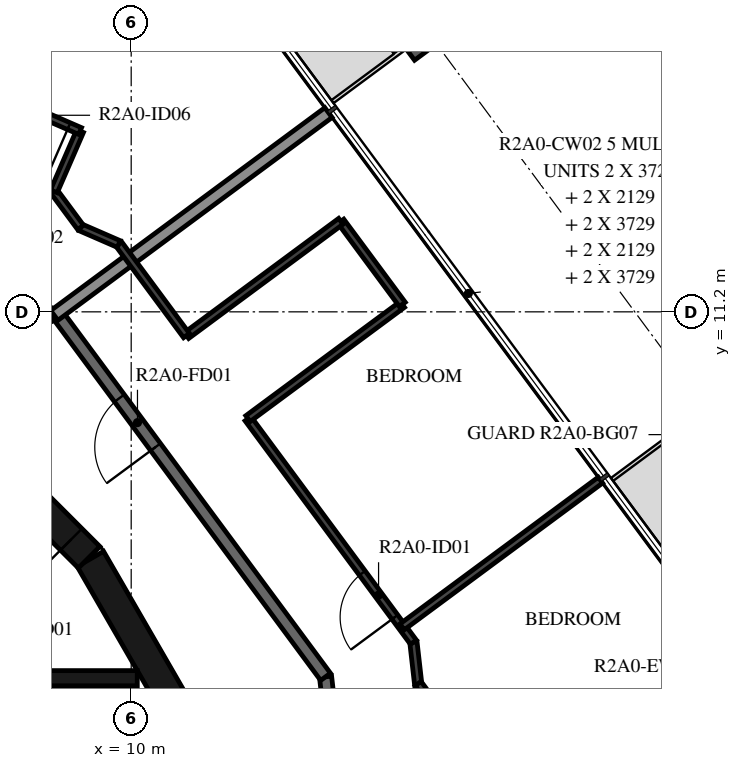
"""IFC4 building model, lengths in metres.
Left out: names, types, materials, properties, quantities, classifications, styles, units other than length and angle.
Written with IfcOpenShell. Run it as: python <this file> out.ifc"""

import sys

from ifc_helpers import new_model, si_unit, direction, frame, frame_2d, origin, origin_2d, place, context, subcontext, project, spatial, polyline, rectangle, i_section, outline, extrude, element, fill, save


model = new_model("IFC4")
c1 = context("Model", 3, precision=1e-05, world=origin(), true_north=direction((0.0, 1.0)))
c2 = subcontext(c1, "Body", "Model", "MODEL_VIEW")
j1 = project(units=[si_unit("LENGTHUNIT", "METRE"), si_unit("PLANEANGLEUNIT", "RADIAN")], contexts=[c1])
p1 = place(None, origin())
s1 = spatial("IfcSite", under=j1, at=p1, CompositionType="ELEMENT")
p2 = place(p1, origin())
s2 = spatial("IfcBuilding", under=s1, at=p2, CompositionType="ELEMENT")
p3 = place(p2, frame((0.0, 0.0, 83.7)))
s3 = spatial("IfcBuildingStorey", under=s2, at=p3, CompositionType="ELEMENT", Elevation=83.7)
p4 = place(p3, frame((14.932, 15.726, -0.38), z_axis=(0.0, 0.0, 1.0), x_axis=(0.594822857897, -0.803856807972, 0.0)))
e1 = element("IfcColumn", 1, at=p4, inside=s3, PredefinedType="COLUMN", context=c2, shape_type="SweptSolid", body=[
    extrude(i_section(OverallWidth=0.3, OverallDepth=0.9, WebThickness=0.019, FlangeThickness=0.035, FilletRadius=0.03, at=origin_2d()), origin(), (0.0, 0.0, 1.0), 3.5),
])
p5 = place(p3, frame((10.845, 4.51, 0.0), z_axis=(0.0, 0.0, 1.0), x_axis=(-0.500087131594, 0.865975092491, 0.0)))
e2 = element("IfcWall", 2, at=p5, inside=s3, PredefinedType="SHEAR", context=c2, shape_type="SweptSolid", body=[
    extrude(rectangle(XDim=3.033, YDim=0.5, at=frame_2d((1.516, 0.0))), origin(), (0.0, 0.0, 1.0), 3.12),
])
p6 = place(p3, frame((9.308, 7.164, 0.0), z_axis=(0.0, 0.0, 1.0), x_axis=(-0.707106781187, 0.707106781187, 0.0)))
e3 = element("IfcWall", 3, at=p6, inside=s3, PredefinedType="SHEAR", context=c2, shape_type="SweptSolid", body=[
    extrude(rectangle(XDim=3.032, YDim=0.5, at=frame_2d((1.516, 0.0))), origin(), (0.0, 0.0, 1.0), 3.12),
])
p7 = place(p6, frame((0.416, 0.0, 0.0)))
e4 = element("IfcOpeningElement", 4, at=p7, cuts=e3, PredefinedType="OPENING", context=c2, shape_type="SweptSolid", body=[
    extrude(rectangle(XDim=1.2, YDim=2.1, at=frame_2d((0.6, 1.05))), frame((0.0, 0.26, 0.0), z_axis=(0.0, -1.0, 0.0), x_axis=(1.0, 0.0, 0.0)), (0.0, 0.0, 1.0), 0.52),
])
p8 = place(p3, frame((7.0, 5.175, 0.0), z_axis=(0.0, 0.0, 1.0), x_axis=(1.0, 0.0, 0.0)))
e5 = element("IfcWall", 5, at=p8, inside=s3, PredefinedType="SHEAR", context=c2, shape_type="SweptSolid", body=[
    extrude(rectangle(XDim=3.1, YDim=0.25, at=frame_2d((1.55, 0.0))), origin(), (0.0, 0.0, 1.0), 3.12),
])
p9 = place(p3, origin())
e6 = element("IfcWall", 6, at=p9, inside=s3, PredefinedType="SHEAR", context=c2, shape_type="SweptSolid", body=[
    extrude(outline(polyline([(-9.55, 4.8), (-7.65, 4.8), (-7.65, 1.9), (-7.4, 1.9), (-7.4, 4.8), (-5.5, 4.8), (-5.5, 1.9), (-5.25, 1.9), (-5.25, 4.8), (-3.35, 4.8), (-3.35, 1.9), (-3.1, 1.9), (-3.1, 4.8), (-1.2, 4.8), (-1.2, 1.9), (-0.95, 1.9), (-0.95, 4.8), (3.1, 4.8), (3.1, 1.9), (3.35, 1.9), (3.35, 4.8), (5.25, 4.8), (5.25, 1.9), (5.5, 1.9), (5.5, 4.8), (7.4, 4.8), (7.4, 1.9), (7.65, 1.9), (7.65, 4.8), (9.55, 4.8), (9.55, 1.9), (9.8, 1.9), (9.8, 4.8), (9.8, 5.05), (-9.8, 5.05), (-9.8, 4.8), (-9.8, 1.9), (-9.55, 1.9), (-9.55, 4.8)])), origin(), (0.0, 0.0, 1.0), 3.12),
])
p10 = place(p3, frame((14.028, -2.096, 0.0), z_axis=(0.0, 0.0, 1.0), x_axis=(-0.113226782163, 0.993569170114, 0.0)))
e7 = element("IfcWall", 7, at=p10, inside=s3, PredefinedType="STANDARD", context=c2, shape_type="SweptSolid", body=[
    extrude(rectangle(XDim=7.342, YDim=0.2, at=frame_2d((3.671, 0.0))), origin(), (0.0, 0.0, 1.0), 3.12),
])
p11 = place(p3, frame((13.196, 5.198, 0.0), z_axis=(0.0, 0.0, 1.0), x_axis=(-0.594805187394, 0.803869883159, 0.0)))
e8 = element("IfcWall", 8, at=p11, inside=s3, PredefinedType="STANDARD", context=c2, shape_type="SweptSolid", body=[
    extrude(rectangle(XDim=7.342, YDim=0.2, at=frame_2d((3.671, 0.0))), origin(), (0.0, 0.0, 1.0), 3.12),
])
p12 = place(p11, frame((4.7, 0.0, 0.0)))
e9 = element("IfcOpeningElement", 9, at=p12, cuts=e8, PredefinedType="OPENING", context=c2, shape_type="SweptSolid", body=[
    extrude(rectangle(XDim=1.0, YDim=2.1, at=frame_2d((0.5, 1.05))), frame((0.0, 0.11, 0.0), z_axis=(0.0, -1.0, 0.0), x_axis=(1.0, 0.0, 0.0)), (0.0, 0.0, 1.0), 0.22),
])
p13 = place(p3, frame((8.736, 11.141, 0.0), z_axis=(0.0, 0.0, 1.0), x_axis=(-0.917051290697, 0.398769269416, 0.0)))
e10 = element("IfcWall", 10, at=p13, inside=s3, PredefinedType="STANDARD", context=c2, shape_type="SweptSolid", body=[
    extrude(rectangle(XDim=7.24, YDim=0.2, at=frame_2d((3.62, 0.0))), origin(), (0.0, 0.0, 1.0), 3.12),
])
p14 = place(p13, frame((0.2, 0.0, 0.0)))
e11 = element("IfcOpeningElement", 11, at=p14, cuts=e10, PredefinedType="OPENING", context=c2, shape_type="SweptSolid", body=[
    extrude(rectangle(XDim=1.0, YDim=2.1, at=frame_2d((0.5, 1.05))), frame((0.0, 0.11, 0.0), z_axis=(0.0, -1.0, 0.0), x_axis=(1.0, 0.0, 0.0)), (0.0, 0.0, 1.0), 0.22),
])
p15 = place(p3, frame((13.244, 14.477, 0.0), z_axis=(0.0, 0.0, 1.0), x_axis=(-0.803853971109, -0.594826691677, 0.0)))
e12 = element("IfcWall", 12, at=p15, inside=s3, PredefinedType="STANDARD", context=c2, shape_type="SweptSolid", body=[
    extrude(rectangle(XDim=5.609, YDim=0.2, at=frame_2d((2.804, 0.0))), origin(), (0.0, 0.0, 1.0), 2.73),
])
p16 = place(p3, frame((15.563, -2.326, 0.0), z_axis=(0.0, 0.0, 1.0), x_axis=(-0.11320423706, 0.993571739087, 0.0)))
e13 = element("IfcWall", 13, at=p16, inside=s3, PredefinedType="PARTITIONING", context=c2, shape_type="SweptSolid", body=[
    extrude(rectangle(XDim=8.146, YDim=0.12, at=frame_2d((4.073, 0.0))), origin(), (0.0, 0.0, 1.0), 3.12),
])
p17 = place(p16, frame((1.592, 0.0, 0.0)))
e14 = element("IfcOpeningElement", 14, at=p17, cuts=e13, PredefinedType="OPENING", context=c2, shape_type="SweptSolid", body=[
    extrude(rectangle(XDim=0.8, YDim=2.1, at=frame_2d((0.4, 1.05))), frame((0.0, 0.07, 0.0), z_axis=(0.0, -1.0, 0.0), x_axis=(1.0, 0.0, 0.0)), (0.0, 0.0, 1.0), 0.14),
])
p18 = place(p3, frame((14.641, 5.767, 0.0), z_axis=(0.0, 0.0, 1.0), x_axis=(-0.594785744505, 0.803884269117, 0.0)))
e15 = element("IfcWall", 15, at=p18, inside=s3, PredefinedType="PARTITIONING", context=c2, shape_type="SweptSolid", body=[
    extrude(rectangle(XDim=4.573, YDim=0.12, at=frame_2d((2.287, 0.0))), origin(), (0.0, 0.0, 1.0), 3.12),
])
p19 = place(p18, frame((0.513, 0.0, 0.0)))
e16 = element("IfcOpeningElement", 16, at=p19, cuts=e15, PredefinedType="OPENING", context=c2, shape_type="SweptSolid", body=[
    extrude(rectangle(XDim=0.9, YDim=2.1, at=frame_2d((0.45, 1.05))), frame((0.0, 0.07, 0.0), z_axis=(0.0, -1.0, 0.0), x_axis=(1.0, 0.0, 0.0)), (0.0, 0.0, 1.0), 0.14),
])
p20 = place(p3, frame((11.921, 9.444, 0.0), z_axis=(0.0, 0.0, 1.0), x_axis=(0.803843378098, 0.594841006898, 0.0)))
e17 = element("IfcWall", 17, at=p20, inside=s3, PredefinedType="PARTITIONING", context=c2, shape_type="SweptSolid", body=[
    extrude(rectangle(XDim=3.157, YDim=0.12, at=frame_2d((1.579, 0.0))), origin(), (0.0, 0.0, 1.0), 3.12),
])
p21 = place(p3, frame((14.459, 11.322, 0.0), z_axis=(0.0, 0.0, 1.0), x_axis=(-0.594863421241, 0.803826791087, 0.0)))
e18 = element("IfcWall", 18, at=p21, inside=s3, PredefinedType="PARTITIONING", context=c2, shape_type="SweptSolid", body=[
    extrude(rectangle(XDim=1.7, YDim=0.12, at=frame_2d((0.85, 0.0))), origin(), (0.0, 0.0, 1.0), 3.12),
])
p22 = place(p3, frame((13.448, 12.688, 0.0), z_axis=(0.0, 0.0, 1.0), x_axis=(-0.803843378098, -0.594841006898, 0.0)))
e19 = element("IfcWall", 19, at=p22, inside=s3, PredefinedType="PARTITIONING", context=c2, shape_type="SweptSolid", body=[
    extrude(rectangle(XDim=3.157, YDim=0.12, at=frame_2d((1.579, 0.0))), origin(), (0.0, 0.0, 1.0), 3.12),
])
p23 = place(p3, frame((10.91, 10.81, 0.0), z_axis=(0.0, 0.0, 1.0), x_axis=(-0.59489693125, 0.803801991282, 0.0)))
e20 = element("IfcWall", 20, at=p23, inside=s3, PredefinedType="PARTITIONING", context=c2, shape_type="SweptSolid", body=[
    extrude(rectangle(XDim=1.872, YDim=0.12, at=frame_2d((0.936, 0.0))), origin(), (0.0, 0.0, 1.0), 3.12),
])
p24 = place(p3, frame((21.201, -3.674, 0.0), z_axis=(0.0, 0.0, 1.0), x_axis=(-0.594822450109, 0.803857109719, 0.0)))
e21 = element("IfcWall", 21, at=p24, inside=s3, PredefinedType="PARTITIONING", context=c2, shape_type="SweptSolid", body=[
    extrude(rectangle(XDim=10.898, YDim=0.12, at=frame_2d((5.449, 0.0))), origin(), (0.0, 0.0, 1.0), 3.12),
])
p25 = place(p24, frame((0.2, 0.0, 0.0)))
e22 = element("IfcOpeningElement", 22, at=p25, cuts=e21, PredefinedType="OPENING", context=c2, shape_type="SweptSolid", body=[
    extrude(rectangle(XDim=0.9, YDim=2.1, at=frame_2d((0.45, 1.05))), frame((0.0, 0.07, 0.0), z_axis=(0.0, -1.0, 0.0), x_axis=(1.0, 0.0, 0.0)), (0.0, 0.0, 1.0), 0.14),
])
p26 = place(p3, frame((17.717, 8.433, 0.0), z_axis=(0.0, 0.0, 1.0), x_axis=(-0.803853407146, -0.594827453821, 0.0)))
e23 = element("IfcWall", 23, at=p26, inside=s3, PredefinedType="PARTITIONING", context=c2, shape_type="SweptSolid", body=[
    extrude(rectangle(XDim=4.058, YDim=0.12, at=frame_2d((2.029, 0.0))), origin(), (0.0, 0.0, 1.0), 2.73),
])
p27 = place(p3, frame((9.796, 12.315, 0.0), z_axis=(0.0, 0.0, 1.0), x_axis=(-0.916973672273, 0.398947721335, 0.0)))
e24 = element("IfcWall", 24, at=p27, inside=s3, PredefinedType="PARTITIONING", context=c2, shape_type="SweptSolid", body=[
    extrude(rectangle(XDim=0.685, YDim=0.12, at=frame_2d((0.342, 0.0))), origin(), (0.0, 0.0, 1.0), 3.12),
])
p28 = place(p3, frame((9.168, 12.588, 0.0), z_axis=(0.0, 0.0, 1.0), x_axis=(-0.595069416139, 0.803674305908, 0.0)))
e25 = element("IfcWall", 25, at=p28, inside=s3, PredefinedType="PARTITIONING", context=c2, shape_type="SweptSolid", body=[
    extrude(rectangle(XDim=0.739, YDim=0.12, at=frame_2d((0.369, 0.0))), origin(), (0.0, 0.0, 1.0), 3.12),
])
p29 = place(p3, frame((8.729, 13.182, 0.0), z_axis=(0.0, 0.0, 1.0), x_axis=(0.398792168027, 0.917041333158, 0.0)))
e26 = element("IfcWall", 26, at=p29, inside=s3, PredefinedType="PARTITIONING", context=c2, shape_type="SweptSolid", body=[
    extrude(rectangle(XDim=1.081, YDim=0.12, at=frame_2d((0.541, 0.0))), origin(), (0.0, 0.0, 1.0), 3.12),
])
p30 = place(p3, frame((9.16, 14.173, 0.0), z_axis=(0.0, 0.0, 1.0), x_axis=(-0.917044941137, 0.398783871208, 0.0)))
e27 = element("IfcWall", 27, at=p30, inside=s3, PredefinedType="PARTITIONING", context=c2, shape_type="SweptSolid", body=[
    extrude(rectangle(XDim=1.7, YDim=0.12, at=frame_2d((0.85, 0.0))), origin(), (0.0, 0.0, 1.0), 3.12),
])
p31 = place(p30, frame((0.2, 0.0, 0.0)))
e28 = element("IfcOpeningElement", 28, at=p31, cuts=e27, PredefinedType="OPENING", context=c2, shape_type="SweptSolid", body=[
    extrude(rectangle(XDim=0.9, YDim=2.1, at=frame_2d((0.45, 1.05))), frame((0.0, 0.07, 0.0), z_axis=(0.0, -1.0, 0.0), x_axis=(1.0, 0.0, 0.0)), (0.0, 0.0, 1.0), 0.14),
])
p32 = place(p3, frame((8.772, 20.521, 0.0), z_axis=(0.0, 0.0, 1.0), x_axis=(-0.202291839423, -0.979325283909, 0.0)))
e29 = element("IfcWall", 29, at=p32, inside=s3, PredefinedType="PARTITIONING", context=c2, shape_type="SweptSolid", body=[
    extrude(rectangle(XDim=5.789, YDim=0.12, at=frame_2d((2.895, 0.0))), origin(), (0.0, 0.0, 1.0), 3.12),
])
p33 = place(p7, origin())
e30 = element("IfcDoor", 30, at=p33, inside=s3, OperationType="SINGLE_SWING_RIGHT", PredefinedType="DOOR", context=c2, shape_type="SweptSolid", body=[
    extrude(rectangle(XDim=1.2, YDim=2.1, at=frame_2d((0.6, 1.05))), frame((0.0, 0.025, 0.0), z_axis=(0.0, -1.0, 0.0), x_axis=(1.0, 0.0, 0.0)), (0.0, 0.0, 1.0), 0.05),
])
fill(e4, e30)
p34 = place(p12, origin())
e31 = element("IfcDoor", 31, at=p34, inside=s3, OperationType="SINGLE_SWING_RIGHT", PredefinedType="DOOR", context=c2, shape_type="SweptSolid", body=[
    extrude(rectangle(XDim=1.0, YDim=2.1, at=frame_2d((0.5, 1.05))), frame((0.0, 0.025, 0.0), z_axis=(0.0, -1.0, 0.0), x_axis=(1.0, 0.0, 0.0)), (0.0, 0.0, 1.0), 0.05),
])
fill(e9, e31)
p35 = place(p19, origin())
e32 = element("IfcDoor", 32, at=p35, inside=s3, OperationType="SINGLE_SWING_LEFT", PredefinedType="DOOR", context=c2, shape_type="SweptSolid", body=[
    extrude(rectangle(XDim=0.9, YDim=2.1, at=frame_2d((0.45, 1.05))), frame((0.0, 0.025, 0.0), z_axis=(0.0, -1.0, 0.0), x_axis=(1.0, 0.0, 0.0)), (0.0, 0.0, 1.0), 0.05),
])
fill(e16, e32)
p36 = place(p31, origin())
e33 = element("IfcDoor", 33, at=p36, inside=s3, OperationType="SINGLE_SWING_RIGHT", PredefinedType="DOOR", context=c2, shape_type="SweptSolid", body=[
    extrude(rectangle(XDim=0.9, YDim=2.1, at=frame_2d((0.45, 1.05))), frame((0.0, 0.025, 0.0), z_axis=(0.0, -1.0, 0.0), x_axis=(1.0, 0.0, 0.0)), (0.0, 0.0, 1.0), 0.05),
])
fill(e28, e33)
save(model, sys.argv[1])
